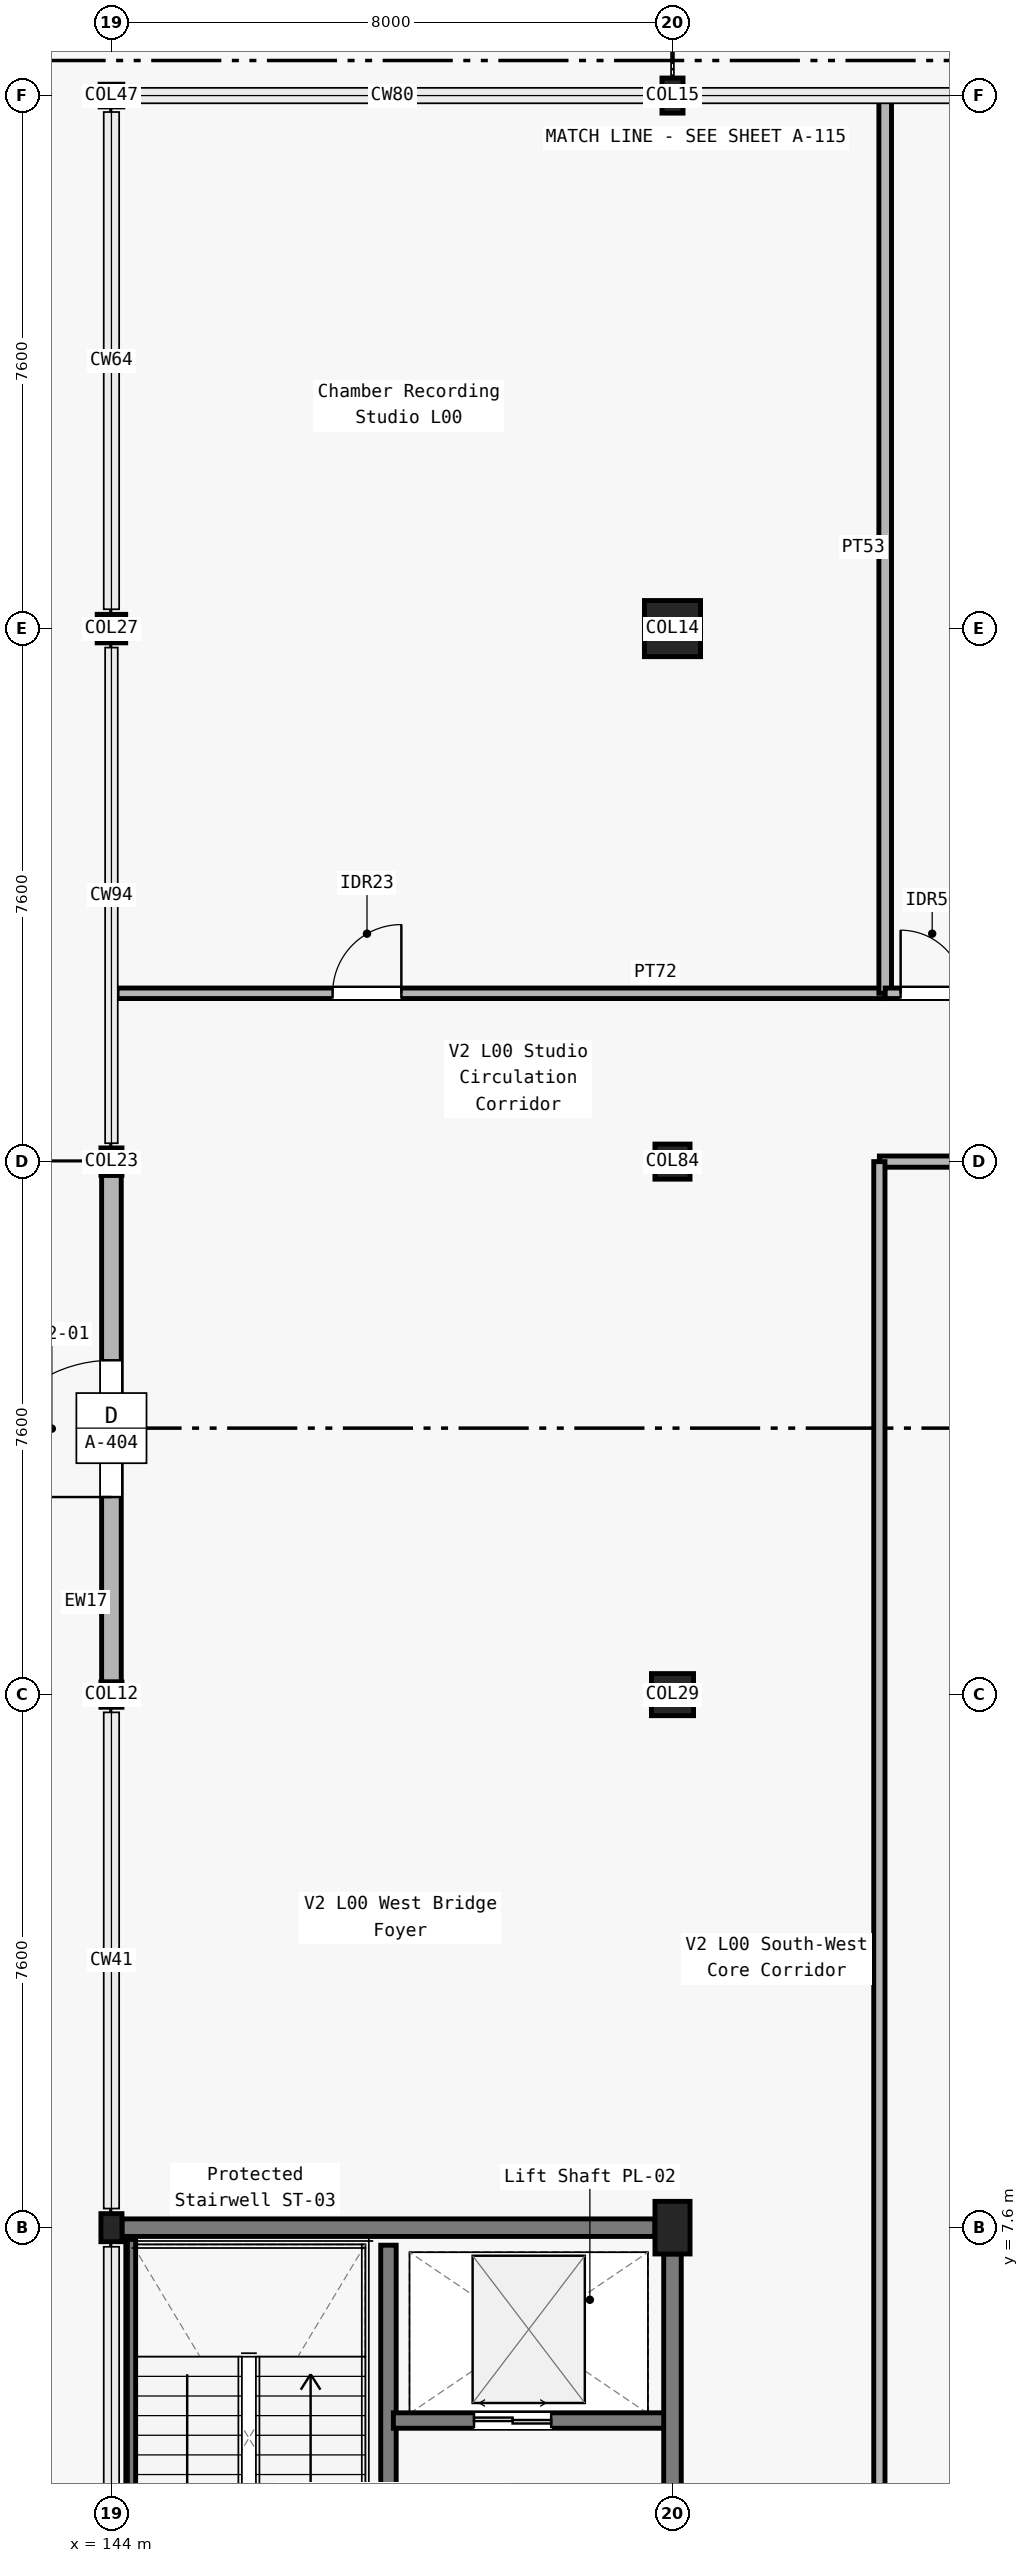
"""IFC4 building model, lengths in metres.
Left out: names, types, materials, properties, quantities, classifications, styles, units other than length and angle.
Written with IfcOpenShell. Run it as: python <this file> out.ifc"""

import sys

from ifc_helpers import new_model, si_unit, direction, frame, frame_2d, origin, origin_2d, place, context, subcontext, project, spatial, rectangle, circle, hollow_circle, i_section, extrude, element, fill, save


model = new_model("IFC4")
c1 = context("Model", 3, precision=1e-05, world=origin(), true_north=direction((0.0, 1.0)))
c2 = subcontext(c1, "Body", "Model", "MODEL_VIEW")
j1 = project(units=[si_unit("LENGTHUNIT", "METRE"), si_unit("PLANEANGLEUNIT", "RADIAN")], contexts=[c1])
p1 = place(None, origin())
s1 = spatial("IfcSite", under=j1, at=p1, CompositionType="ELEMENT")
p2 = place(p1, origin())
s2 = spatial("IfcBuilding", under=s1, at=p2, CompositionType="ELEMENT")
p3 = place(p2, origin())
s3 = spatial("IfcBuildingStorey", under=s2, at=p3, CompositionType="ELEMENT", Elevation=0.0)
p4 = place(p3, frame((144.0, 7.6, 0.0), z_axis=(0.0, 0.0, 1.0), x_axis=(1.0, 0.0, 0.0)))
e1 = element("IfcColumn", 1, at=p4, inside=s3, PredefinedType="COLUMN", context=c2, shape_type="SweptSolid", body=[
    extrude(i_section(OverallWidth=0.3, OverallDepth=0.4, WebThickness=0.013, FlangeThickness=0.024, FilletRadius=0.027, at=origin_2d()), origin(), (0.0, 0.0, 1.0), 5.4),
])
p5 = place(p3, frame((144.0, 15.2, 0.0), z_axis=(0.0, 0.0, 1.0), x_axis=(1.0, 0.0, 0.0)))
e2 = element("IfcColumn", 2, at=p5, inside=s3, PredefinedType="COLUMN", context=c2, shape_type="SweptSolid", body=[
    extrude(i_section(OverallWidth=0.3, OverallDepth=0.36, WebThickness=0.012, FlangeThickness=0.022, FilletRadius=0.027, at=origin_2d()), origin(), (0.0, 0.0, 1.0), 5.4),
])
p6 = place(p3, frame((144.0, 22.8, 0.0), z_axis=(0.0, 0.0, 1.0), x_axis=(1.0, 0.0, 0.0)))
e3 = element("IfcColumn", 3, at=p6, inside=s3, PredefinedType="COLUMN", context=c2, shape_type="SweptSolid", body=[
    extrude(i_section(OverallWidth=0.3, OverallDepth=0.39, WebThickness=0.011, FlangeThickness=0.019, FilletRadius=0.027, at=origin_2d()), origin(), (0.0, 0.0, 1.0), 5.4),
])
p7 = place(p3, frame((144.0, 30.4, 0.0), z_axis=(0.0, 0.0, 1.0), x_axis=(1.0, 0.0, 0.0)))
e4 = element("IfcColumn", 4, at=p7, inside=s3, PredefinedType="COLUMN", context=c2, shape_type="SweptSolid", body=[
    extrude(hollow_circle(Radius=0.203, WallThickness=0.02, at=origin_2d()), origin(), (0.0, 0.0, 1.0), 5.4),
])
p8 = place(p3, frame((144.0, 38.0, 0.0), z_axis=(0.0, 0.0, 1.0), x_axis=(1.0, 0.0, 0.0)))
e5 = element("IfcColumn", 5, at=p8, inside=s3, PredefinedType="COLUMN", context=c2, shape_type="SweptSolid", body=[
    extrude(hollow_circle(Radius=0.162, WallThickness=0.016, at=origin_2d()), origin(), (0.0, 0.0, 1.0), 5.4),
])
p9 = place(p3, frame((152.0, 7.6, 0.0), z_axis=(0.0, 0.0, 1.0), x_axis=(1.0, 0.0, 0.0)))
e6 = element("IfcColumn", 6, at=p9, inside=s3, PredefinedType="COLUMN", context=c2, shape_type="SweptSolid", body=[
    extrude(rectangle(XDim=0.5, YDim=0.75, at=origin_2d()), origin(), (0.0, 0.0, 1.0), 5.4),
])
p10 = place(p3, frame((152.0, 15.2, 0.0), z_axis=(0.0, 0.0, 1.0), x_axis=(1.0, 0.0, 0.0)))
e7 = element("IfcColumn", 7, at=p10, inside=s3, PredefinedType="COLUMN", context=c2, shape_type="SweptSolid", body=[
    extrude(rectangle(XDim=0.6, YDim=0.6, at=origin_2d()), origin(), (0.0, 0.0, 1.0), 5.4),
])
p11 = place(p3, frame((152.0, 22.8, 0.0), z_axis=(0.0, 0.0, 1.0), x_axis=(1.0, 0.0, 0.0)))
e8 = element("IfcColumn", 8, at=p11, inside=s3, PredefinedType="COLUMN", context=c2, shape_type="SweptSolid", body=[
    extrude(rectangle(XDim=0.5, YDim=0.5, at=origin_2d()), origin(), (0.0, 0.0, 1.0), 5.4),
])
p12 = place(p3, frame((152.0, 30.4, 0.0), z_axis=(0.0, 0.0, 1.0), x_axis=(1.0, 0.0, 0.0)))
e9 = element("IfcColumn", 9, at=p12, inside=s3, PredefinedType="COLUMN", context=c2, shape_type="SweptSolid", body=[
    extrude(circle(Radius=0.4, at=origin_2d()), origin(), (0.0, 0.0, 1.0), 5.4),
])
p13 = place(p3, frame((152.0, 38.0, 0.0), z_axis=(0.0, 0.0, 1.0), x_axis=(1.0, 0.0, 0.0)))
e10 = element("IfcColumn", 10, at=p13, inside=s3, PredefinedType="COLUMN", context=c2, shape_type="SweptSolid", body=[
    extrude(i_section(OverallWidth=0.3, OverallDepth=0.5, WebThickness=0.014, FlangeThickness=0.028, FilletRadius=0.027, at=origin_2d()), origin(), (0.0, 0.0, 1.0), 5.4),
])
p14 = place(p3, frame((144.0, 15.38, 0.0), z_axis=(0.0, 0.0, 1.0), x_axis=(0.0, 1.0, 0.0)))
e11 = element("IfcWall", 11, at=p14, inside=s3, PredefinedType="SOLIDWALL", context=c2, shape_type="SweptSolid", body=[
    extrude(rectangle(XDim=7.225, YDim=0.28, at=frame_2d((3.613, 0.0))), origin(), (0.0, 0.0, 1.0), 4.44),
])
p15 = place(p14, frame((2.637, 0.0, 0.0)))
e12 = element("IfcOpeningElement", 12, at=p15, cuts=e11, PredefinedType="OPENING", context=c2, shape_type="SweptSolid", body=[
    extrude(rectangle(XDim=1.95, YDim=2.25, at=frame_2d((0.975, 1.125))), frame((0.0, 0.15, 0.0), z_axis=(0.0, -1.0, 0.0), x_axis=(1.0, 0.0, 0.0)), (0.0, 0.0, 1.0), 0.3),
])
p16 = place(p3, frame((144.15, 7.6, 0.0), z_axis=(0.0, 0.0, 1.0), x_axis=(1.0, 0.0, 0.0)))
e13 = element("IfcWall", 13, at=p16, inside=s3, PredefinedType="SOLIDWALL", context=c2, shape_type="SweptSolid", body=[
    extrude(rectangle(XDim=7.6, YDim=0.25, at=frame_2d((3.8, 0.0))), origin(), (0.0, 0.0, 1.0), 4.235),
])
p17 = place(p3, frame((147.95, 0.25, 0.0), z_axis=(0.0, 0.0, 1.0), x_axis=(0.0, 1.0, 0.0)))
e14 = element("IfcWall", 14, at=p17, inside=s3, PredefinedType="SOLIDWALL", context=c2, shape_type="SweptSolid", body=[
    extrude(rectangle(XDim=7.1, YDim=0.22, at=frame_2d((3.55, 0.0))), origin(), (0.0, 0.0, 1.0), 5.1),
])
p18 = place(p17, frame((0.35, 0.0, 0.0)))
e15 = element("IfcOpeningElement", 15, at=p18, cuts=e14, PredefinedType="OPENING", context=c2, shape_type="SweptSolid", body=[
    extrude(rectangle(XDim=1.2, YDim=2.15, at=frame_2d((0.6, 1.075))), frame((0.0, 0.12, 0.0), z_axis=(0.0, -1.0, 0.0), x_axis=(1.0, 0.0, 0.0)), (0.0, 0.0, 1.0), 0.24),
])
p19 = place(p3, frame((148.02, 4.85, 0.0), z_axis=(0.0, 0.0, 1.0), x_axis=(1.0, 0.0, 0.0)))
e16 = element("IfcWall", 16, at=p19, inside=s3, PredefinedType="SOLIDWALL", context=c2, shape_type="SweptSolid", body=[
    extrude(rectangle(XDim=3.93, YDim=0.22, at=frame_2d((1.965, 0.0))), origin(), (0.0, 0.0, 1.0), 4.475),
])
p20 = place(p19, frame((1.15, 0.0, 0.0)))
e17 = element("IfcOpeningElement", 17, at=p20, cuts=e16, PredefinedType="OPENING", context=c2, shape_type="SweptSolid", body=[
    extrude(rectangle(XDim=1.1, YDim=2.2, at=frame_2d((0.55, 1.1))), frame((0.0, 0.12, 0.0), z_axis=(0.0, -1.0, 0.0), x_axis=(1.0, 0.0, 0.0)), (0.0, 0.0, 1.0), 0.24),
])
p21 = place(p3, frame((152.0, 0.2, 0.0), z_axis=(0.0, 0.0, 1.0), x_axis=(0.0, 1.0, 0.0)))
e18 = element("IfcWall", 18, at=p21, inside=s3, PredefinedType="SOLIDWALL", context=c2, shape_type="SweptSolid", body=[
    extrude(rectangle(XDim=7.025, YDim=0.25, at=frame_2d((3.513, 0.0))), origin(), (0.0, 0.0, 1.0), 4.455),
])
p22 = place(p21, frame((2.15, 0.0, 0.0)))
e19 = element("IfcOpeningElement", 19, at=p22, cuts=e18, PredefinedType="OPENING", context=c2, shape_type="SweptSolid", body=[
    extrude(rectangle(XDim=1.35, YDim=2.2, at=frame_2d((0.675, 1.1))), frame((0.0, 0.135, 0.0), z_axis=(0.0, -1.0, 0.0), x_axis=(1.0, 0.0, 0.0)), (0.0, 0.0, 1.0), 0.27),
])
p23 = place(p3, frame((154.95, 22.8, 0.0), z_axis=(0.0, 0.0, 1.0), x_axis=(1.0, 0.0, 0.0)))
e20 = element("IfcWall", 20, at=p23, inside=s3, PredefinedType="PARTITIONING", context=c2, shape_type="SweptSolid", body=[
    extrude(rectangle(XDim=10.059, YDim=0.16, at=frame_2d((5.03, 0.0))), origin(), (0.0, 0.0, 1.0), 4.14),
])
p24 = place(p23, frame((8.539, 0.0, 0.0)))
e21 = element("IfcOpeningElement", 21, at=p24, cuts=e20, PredefinedType="OPENING", context=c2, shape_type="SweptSolid", body=[
    extrude(rectangle(XDim=1.38, YDim=2.2, at=frame_2d((0.69, 1.1))), frame((0.0, 0.09, 0.0), z_axis=(0.0, -1.0, 0.0), x_axis=(1.0, 0.0, 0.0)), (0.0, 0.0, 1.0), 0.18),
])
p25 = place(p3, frame((154.95, 0.08, 0.0), z_axis=(0.0, 0.0, 1.0), x_axis=(0.0, 1.0, 0.0)))
e22 = element("IfcWall", 22, at=p25, inside=s3, PredefinedType="PARTITIONING", context=c2, shape_type="SweptSolid", body=[
    extrude(rectangle(XDim=22.72, YDim=0.16, at=frame_2d((11.36, 0.0))), origin(), (0.0, 0.0, 1.0), 4.14),
])
p26 = place(p3, frame((144.08, 25.2, 0.0), z_axis=(0.0, 0.0, 1.0), x_axis=(1.0, 0.0, 0.0)))
e23 = element("IfcWall", 23, at=p26, inside=s3, PredefinedType="PARTITIONING", context=c2, shape_type="SweptSolid", body=[
    extrude(rectangle(XDim=10.953, YDim=0.15, at=frame_2d((5.477, 0.0))), origin(), (0.0, 0.0, 1.0), 4.325),
])
p27 = place(p26, frame((3.074, 0.0, 0.0)))
e24 = element("IfcOpeningElement", 24, at=p27, cuts=e23, PredefinedType="OPENING", context=c2, shape_type="SweptSolid", body=[
    extrude(rectangle(XDim=0.98, YDim=2.05, at=frame_2d((0.49, 1.025))), frame((0.0, 0.085, 0.0), z_axis=(0.0, -1.0, 0.0), x_axis=(1.0, 0.0, 0.0)), (0.0, 0.0, 1.0), 0.17),
])
p28 = place(p3, frame((155.033, 25.2, 0.0), z_axis=(0.0, 0.0, 1.0), x_axis=(0.0, 1.0, 0.0)))
e25 = element("IfcWall", 25, at=p28, inside=s3, PredefinedType="PARTITIONING", context=c2, shape_type="SweptSolid", body=[
    extrude(rectangle(XDim=12.72, YDim=0.18, at=frame_2d((6.36, 0.0))), origin(), (0.0, 0.0, 1.0), 4.275),
])
p29 = place(p3, frame((155.033, 25.2, 0.0), z_axis=(0.0, 0.0, 1.0), x_axis=(1.0, 0.0, 0.0)))
e26 = element("IfcWall", 26, at=p29, inside=s3, PredefinedType="PARTITIONING", context=c2, shape_type="SweptSolid", body=[
    extrude(rectangle(XDim=8.68, YDim=0.15, at=frame_2d((4.34, 0.0))), origin(), (0.0, 0.0, 1.0), 4.275),
])
p30 = place(p29, frame((0.22, 0.0, 0.0)))
e27 = element("IfcOpeningElement", 27, at=p30, cuts=e26, PredefinedType="OPENING", context=c2, shape_type="SweptSolid", body=[
    extrude(rectangle(XDim=0.9, YDim=2.1, at=frame_2d((0.45, 1.05))), frame((0.0, 0.085, 0.0), z_axis=(0.0, -1.0, 0.0), x_axis=(1.0, 0.0, 0.0)), (0.0, 0.0, 1.0), 0.17),
])
p31 = place(p3, frame((144.275, 0.15, 0.0), z_axis=(0.0, 0.0, 1.0), x_axis=(0.0, 1.0, 0.0)))
e28 = element("IfcWall", 28, at=p31, inside=s3, PredefinedType="SOLIDWALL", context=c2, shape_type="SweptSolid", body=[
    extrude(rectangle(XDim=7.3, YDim=0.14, at=frame_2d((3.65, 0.0))), origin(), (0.0, 0.0, 1.0), 5.1),
])
p32 = place(p15, origin())
e29 = element("IfcDoor", 29, at=p32, inside=s3, OperationType="SINGLE_SWING_LEFT", PredefinedType="DOOR", context=c2, shape_type="SweptSolid", body=[
    extrude(rectangle(XDim=1.95, YDim=2.25, at=frame_2d((0.975, 1.125))), frame((0.0, 0.025, 0.0), z_axis=(0.0, -1.0, 0.0), x_axis=(1.0, 0.0, 0.0)), (0.0, 0.0, 1.0), 0.05),
])
fill(e12, e29)
p33 = place(p20, origin())
e30 = element("IfcDoor", 30, at=p33, inside=s3, OperationType="DOUBLE_DOOR_SLIDING", PredefinedType="DOOR", context=c2, shape_type="SweptSolid", body=[
    extrude(rectangle(XDim=1.1, YDim=2.2, at=frame_2d((0.55, 1.1))), frame((0.0, 0.025, 0.0), z_axis=(0.0, -1.0, 0.0), x_axis=(1.0, 0.0, 0.0)), (0.0, 0.0, 1.0), 0.05),
])
fill(e17, e30)
p34 = place(p27, origin())
e31 = element("IfcDoor", 31, at=p34, inside=s3, OperationType="SINGLE_SWING_RIGHT", PredefinedType="DOOR", context=c2, shape_type="SweptSolid", body=[
    extrude(rectangle(XDim=0.98, YDim=2.05, at=frame_2d((0.49, 1.025))), frame((0.0, 0.025, 0.0), z_axis=(0.0, -1.0, 0.0), x_axis=(1.0, 0.0, 0.0)), (0.0, 0.0, 1.0), 0.05),
])
fill(e24, e31)
p35 = place(p30, origin())
e32 = element("IfcDoor", 32, at=p35, inside=s3, OperationType="SINGLE_SWING_LEFT", PredefinedType="DOOR", context=c2, shape_type="SweptSolid", body=[
    extrude(rectangle(XDim=0.9, YDim=2.1, at=frame_2d((0.45, 1.05))), frame((0.0, 0.025, 0.0), z_axis=(0.0, -1.0, 0.0), x_axis=(1.0, 0.0, 0.0)), (0.0, 0.0, 1.0), 0.05),
])
fill(e27, e32)
save(model, sys.argv[1])
